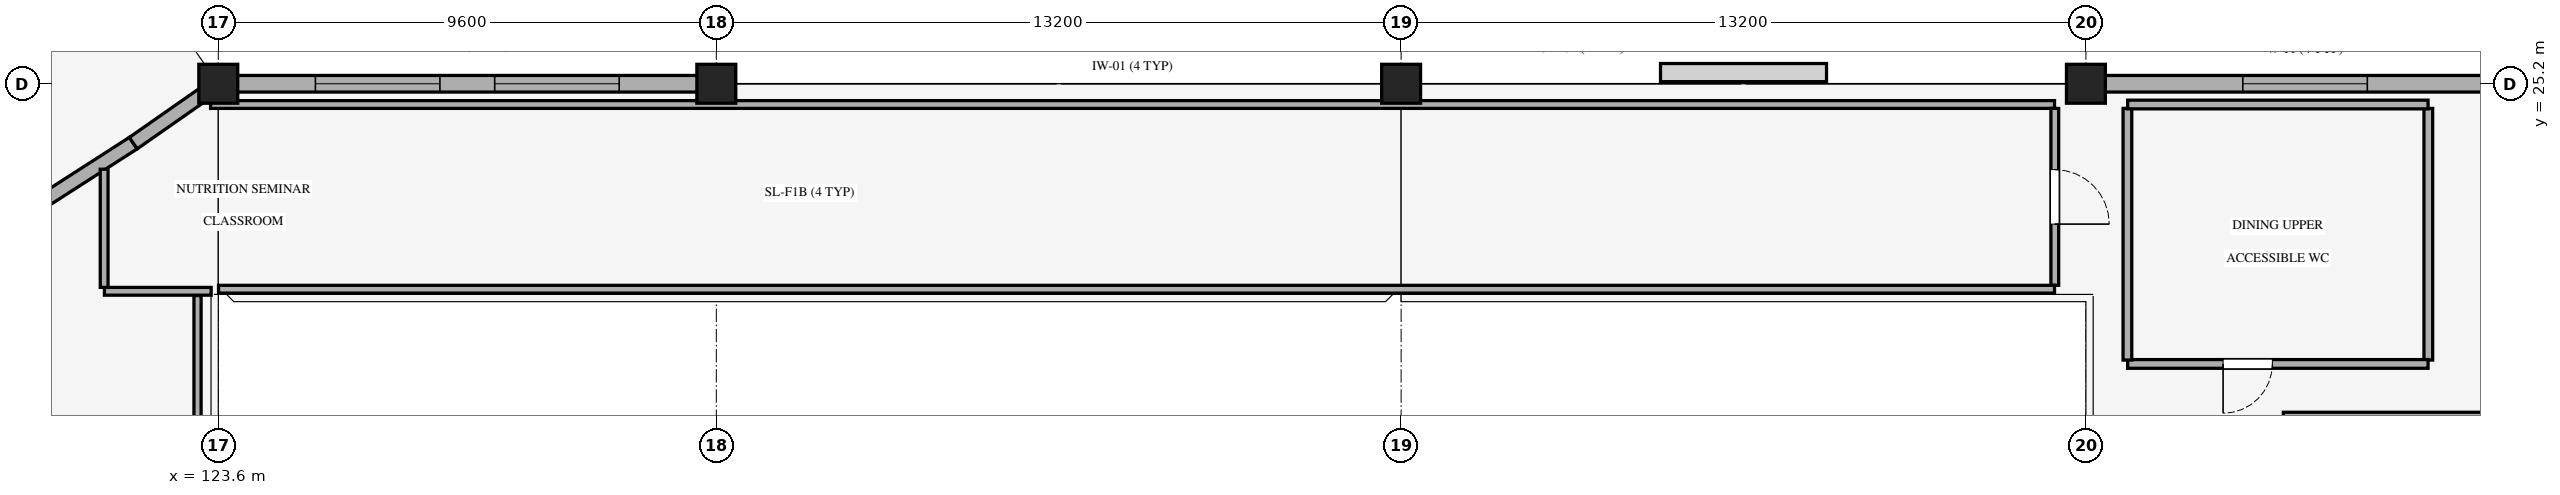
"""IFC4 building model, lengths in metres.
Left out: names, types, materials, properties, quantities, classifications, styles, units other than length and angle.
Written with IfcOpenShell. Run it as: python <this file> out.ifc"""

import sys

from ifc_helpers import new_model, si_unit, direction, frame, frame_2d, origin, origin_2d, place, context, subcontext, project, spatial, rectangle, extrude, element, fill, save


model = new_model("IFC4")
c1 = context("Model", 3, precision=1e-05, world=origin(), true_north=direction((0.0, 1.0)))
c2 = subcontext(c1, "Body", "Model", "MODEL_VIEW")
j1 = project(units=[si_unit("LENGTHUNIT", "METRE"), si_unit("PLANEANGLEUNIT", "RADIAN")], contexts=[c1])
p1 = place(None, origin())
s1 = spatial("IfcSite", under=j1, at=p1, CompositionType="ELEMENT")
p2 = place(p1, origin())
s2 = spatial("IfcBuilding", under=s1, at=p2, CompositionType="ELEMENT")
p3 = place(p2, frame((0.0, 0.0, 4.8)))
s3 = spatial("IfcBuildingStorey", under=s2, at=p3, CompositionType="ELEMENT", Elevation=4.8)
for number, where, z_axis, x_axis in (
    (1, (123.6, 25.2, 0.0), (0.0, 0.0, 1.0), (1.0, 0.0, 0.0)),
    (2, (133.2, 25.2, 0.0), (0.0, 0.0, 1.0), (1.0, 0.0, 0.0)),
    (3, (146.4, 25.2, 0.0), (0.0, 0.0, 1.0), (1.0, 0.0, 0.0)),
    (4, (159.6, 25.2, 0.0), (0.0, 0.0, 1.0), (1.0, 0.0, 0.0)),
):
    element("IfcColumn", number, at=place(p3, frame(where, z_axis=z_axis, x_axis=x_axis)), inside=s3, PredefinedType="COLUMN", context=c2, shape_type="SweptSolid", body=[
        extrude(rectangle(XDim=0.75, YDim=0.75, at=origin_2d()), origin(), (0.0, 0.0, 1.0), 4.8),
    ])
p4 = place(p3, frame((120.28, 22.975, 0.0), z_axis=(0.0, 0.0, 1.0), x_axis=(0.841253874488, 0.540640285826, 0.0)))
e5 = element("IfcWall", 5, at=p4, inside=s3, PredefinedType="STANDARD", context=c2, shape_type="SweptSolid", body=[
    extrude(rectangle(XDim=1.999, YDim=0.268, at=frame_2d((1.0, 0.0))), origin(), (0.0, 0.0, 1.0), 4.205),
])
p5 = place(p3, frame((121.961, 24.056, 0.0), z_axis=(0.0, 0.0, 1.0), x_axis=(0.819942937555, 0.572445263019, 0.0)))
e6 = element("IfcWall", 6, at=p5, inside=s3, PredefinedType="STANDARD", context=c2, shape_type="SweptSolid", body=[
    extrude(rectangle(XDim=1.999, YDim=0.268, at=frame_2d((0.999, 0.0))), origin(), (0.0, 0.0, 1.0), 4.205),
])
p6 = place(p3, frame((123.6, 25.2, 0.0), z_axis=(0.0, 0.0, 1.0), x_axis=(1.0, 0.0, 0.0)))
e7 = element("IfcWall", 7, at=p6, inside=s3, PredefinedType="STANDARD", context=c2, shape_type="SweptSolid", body=[
    extrude(rectangle(XDim=9.6, YDim=0.32, at=frame_2d((4.8, 0.0))), origin(), (0.0, 0.0, 1.0), 4.205),
])
p7 = place(p6, frame((1.872, 0.0, 0.8)))
e8 = element("IfcOpeningElement", 8, at=p7, cuts=e7, PredefinedType="OPENING", context=c2, shape_type="SweptSolid", body=[
    extrude(rectangle(XDim=2.4, YDim=2.1, at=frame_2d((1.2, 1.05))), frame((0.0, 0.17, 0.0), z_axis=(0.0, -1.0, 0.0), x_axis=(1.0, 0.0, 0.0)), (0.0, 0.0, 1.0), 0.34),
])
p8 = place(p6, frame((5.328, 0.0, 0.8)))
e9 = element("IfcOpeningElement", 9, at=p8, cuts=e7, PredefinedType="OPENING", context=c2, shape_type="SweptSolid", body=[
    extrude(rectangle(XDim=2.4, YDim=2.1, at=frame_2d((1.2, 1.05))), frame((0.0, 0.17, 0.0), z_axis=(0.0, -1.0, 0.0), x_axis=(1.0, 0.0, 0.0)), (0.0, 0.0, 1.0), 0.34),
])
p9 = place(p3, frame((159.6, 25.2, 0.0), z_axis=(0.0, 0.0, 1.0), x_axis=(1.0, 0.0, 0.0)))
e10 = element("IfcWall", 10, at=p9, inside=s3, PredefinedType="STANDARD", context=c2, shape_type="SweptSolid", body=[
    extrude(rectangle(XDim=13.2, YDim=0.32, at=frame_2d((6.6, 0.0))), origin(), (0.0, 0.0, 1.0), 4.54),
])
p10 = place(p9, frame((3.024, 0.0, 0.8)))
e11 = element("IfcOpeningElement", 11, at=p10, cuts=e10, PredefinedType="OPENING", context=c2, shape_type="SweptSolid", body=[
    extrude(rectangle(XDim=2.4, YDim=2.1, at=frame_2d((1.2, 1.05))), frame((0.0, 0.17, 0.0), z_axis=(0.0, -1.0, 0.0), x_axis=(1.0, 0.0, 0.0)), (0.0, 0.0, 1.0), 0.34),
])
p11 = place(p9, frame((7.776, 0.0, 0.8)))
e12 = element("IfcOpeningElement", 12, at=p11, cuts=e10, PredefinedType="OPENING", context=c2, shape_type="SweptSolid", body=[
    extrude(rectangle(XDim=2.4, YDim=2.1, at=frame_2d((1.2, 1.05))), frame((0.0, 0.17, 0.0), z_axis=(0.0, -1.0, 0.0), x_axis=(1.0, 0.0, 0.0)), (0.0, 0.0, 1.0), 0.34),
])
p12 = place(p3, frame((123.462, 21.2, 0.0), z_axis=(0.0, 0.0, 1.0), x_axis=(-1.0, 0.0, 0.0)))
e13 = element("IfcWall", 13, at=p12, inside=s3, PredefinedType="STANDARD", context=c2, shape_type="SweptSolid", body=[
    extrude(rectangle(XDim=2.057, YDim=0.15, at=frame_2d((1.029, 0.0))), origin(), (0.0, 0.0, 1.0), 4.54),
])
p13 = place(p3, frame((121.4, 21.275, 0.0), z_axis=(0.0, 0.0, 1.0), x_axis=(0.0, 1.0, 0.0)))
e14 = element("IfcWall", 14, at=p13, inside=s3, PredefinedType="STANDARD", context=c2, shape_type="SweptSolid", body=[
    extrude(rectangle(XDim=2.278, YDim=0.15, at=frame_2d((1.139, 0.0))), origin(), (0.0, 0.0, 1.0), 4.205),
])
p14 = place(p3, frame((123.451, 24.8, 0.0), z_axis=(0.0, 0.0, 1.0), x_axis=(1.0, 0.0, 0.0)))
e15 = element("IfcWall", 15, at=p14, inside=s3, PredefinedType="STANDARD", context=c2, shape_type="SweptSolid", body=[
    extrude(rectangle(XDim=35.544, YDim=0.15, at=frame_2d((17.772, 0.0))), origin(), (0.0, 0.0, 1.0), 4.205),
])
p15 = place(p3, frame((159.0, 24.725, 0.0), z_axis=(0.0, 0.0, 1.0), x_axis=(0.0, -1.0, 0.0)))
e16 = element("IfcWall", 16, at=p15, inside=s3, PredefinedType="STANDARD", context=c2, shape_type="SweptSolid", body=[
    extrude(rectangle(XDim=3.41, YDim=0.15, at=frame_2d((1.705, 0.0))), origin(), (0.0, 0.0, 1.0), 4.54),
])
p16 = place(p15, frame((1.18, 0.0, 0.0)))
e17 = element("IfcOpeningElement", 17, at=p16, cuts=e16, PredefinedType="OPENING", context=c2, shape_type="SweptSolid", body=[
    extrude(rectangle(XDim=1.05, YDim=2.15, at=frame_2d((0.525, 1.075))), frame((0.0, 0.085, 0.0), z_axis=(0.0, -1.0, 0.0), x_axis=(1.0, 0.0, 0.0)), (0.0, 0.0, 1.0), 0.17),
])
p17 = place(p3, frame((158.995, 21.24, 0.0), z_axis=(0.0, 0.0, 1.0), x_axis=(-1.0, 0.0, 0.0)))
e18 = element("IfcWall", 18, at=p17, inside=s3, PredefinedType="STANDARD", context=c2, shape_type="SweptSolid", body=[
    extrude(rectangle(XDim=35.39, YDim=0.15, at=frame_2d((17.695, 0.0))), origin(), (0.0, 0.0, 1.0), 4.54),
])
p18 = place(p3, frame((123.2, 21.117, 0.0), z_axis=(0.0, 0.0, 1.0), x_axis=(0.0, -1.0, 0.0)))
e19 = element("IfcWall", 19, at=p18, inside=s3, PredefinedType="STANDARD", context=c2, shape_type="SweptSolid", body=[
    extrude(rectangle(XDim=12.242, YDim=0.138, at=frame_2d((6.121, 0.0))), origin(), (0.0, 0.0, 1.0), 4.54),
])
p19 = place(p3, frame((163.405, 18.8, 0.0), z_axis=(0.0, 0.0, 1.0), x_axis=(1.0, 0.0, 0.0)))
e20 = element("IfcWall", 20, at=p19, inside=s3, PredefinedType="STANDARD", context=c2, shape_type="SweptSolid", body=[
    extrude(rectangle(XDim=8.99, YDim=0.138, at=frame_2d((4.495, 0.0))), origin(), (0.0, 0.0, 1.0), 4.54),
])
p20 = place(p3, frame((166.2, 24.725, 0.0), z_axis=(0.0, 0.0, 1.0), x_axis=(0.0, -1.0, 0.0)))
e21 = element("IfcWall", 21, at=p20, inside=s3, PredefinedType="STANDARD", context=c2, shape_type="SweptSolid", body=[
    extrude(rectangle(XDim=4.85, YDim=0.168, at=frame_2d((2.425, 0.0))), origin(), (0.0, 0.0, 1.0), 4.54),
])
p21 = place(p3, frame((166.195, 19.8, 0.0), z_axis=(0.0, 0.0, 1.0), x_axis=(-1.0, 0.0, 0.0)))
e22 = element("IfcWall", 22, at=p21, inside=s3, PredefinedType="STANDARD", context=c2, shape_type="SweptSolid", body=[
    extrude(rectangle(XDim=5.79, YDim=0.168, at=frame_2d((2.895, 0.0))), origin(), (0.0, 0.0, 1.0), 4.54),
])
p22 = place(p21, frame((3.001, 0.0, 0.0)))
e23 = element("IfcOpeningElement", 23, at=p22, cuts=e22, PredefinedType="OPENING", context=c2, shape_type="SweptSolid", body=[
    extrude(rectangle(XDim=0.95, YDim=2.1, at=frame_2d((0.475, 1.05))), frame((0.0, 0.094, 0.0), z_axis=(0.0, -1.0, 0.0), x_axis=(1.0, 0.0, 0.0)), (0.0, 0.0, 1.0), 0.188),
])
p23 = place(p3, frame((160.4, 19.875, 0.0), z_axis=(0.0, 0.0, 1.0), x_axis=(0.0, 1.0, 0.0)))
e24 = element("IfcWall", 24, at=p23, inside=s3, PredefinedType="STANDARD", context=c2, shape_type="SweptSolid", body=[
    extrude(rectangle(XDim=4.85, YDim=0.168, at=frame_2d((2.425, 0.0))), origin(), (0.0, 0.0, 1.0), 4.54),
])
p24 = place(p3, frame((160.405, 24.8, 0.0), z_axis=(0.0, 0.0, 1.0), x_axis=(1.0, 0.0, 0.0)))
e25 = element("IfcWall", 25, at=p24, inside=s3, PredefinedType="STANDARD", context=c2, shape_type="SweptSolid", body=[
    extrude(rectangle(XDim=5.79, YDim=0.168, at=frame_2d((2.895, 0.0))), origin(), (0.0, 0.0, 1.0), 4.54),
])
p25 = place(p7, origin())
e26 = element("IfcWindow", 26, at=p25, inside=s3, PartitioningType="SINGLE_PANEL", PredefinedType="WINDOW", context=c2, shape_type="SweptSolid", body=[
    extrude(rectangle(XDim=2.4, YDim=2.1, at=frame_2d((1.2, 1.05))), frame((0.0, 0.03, 0.0), z_axis=(0.0, -1.0, 0.0), x_axis=(1.0, 0.0, 0.0)), (0.0, 0.0, 1.0), 0.06),
])
fill(e8, e26)
p26 = place(p8, origin())
e27 = element("IfcWindow", 27, at=p26, inside=s3, PartitioningType="SINGLE_PANEL", PredefinedType="WINDOW", context=c2, shape_type="SweptSolid", body=[
    extrude(rectangle(XDim=2.4, YDim=2.1, at=frame_2d((1.2, 1.05))), frame((0.0, 0.03, 0.0), z_axis=(0.0, -1.0, 0.0), x_axis=(1.0, 0.0, 0.0)), (0.0, 0.0, 1.0), 0.06),
])
fill(e9, e27)
p27 = place(p10, origin())
e28 = element("IfcWindow", 28, at=p27, inside=s3, PartitioningType="SINGLE_PANEL", PredefinedType="WINDOW", context=c2, shape_type="SweptSolid", body=[
    extrude(rectangle(XDim=2.4, YDim=2.1, at=frame_2d((1.2, 1.05))), frame((0.0, 0.03, 0.0), z_axis=(0.0, -1.0, 0.0), x_axis=(1.0, 0.0, 0.0)), (0.0, 0.0, 1.0), 0.06),
])
fill(e11, e28)
p28 = place(p16, origin())
e29 = element("IfcDoor", 29, at=p28, inside=s3, OperationType="SINGLE_SWING_RIGHT", PredefinedType="DOOR", context=c2, shape_type="SweptSolid", body=[
    extrude(rectangle(XDim=1.05, YDim=2.15, at=frame_2d((0.525, 1.075))), frame((0.0, 0.025, 0.0), z_axis=(0.0, -1.0, 0.0), x_axis=(1.0, 0.0, 0.0)), (0.0, 0.0, 1.0), 0.05),
])
fill(e17, e29)
p29 = place(p22, origin())
e30 = element("IfcDoor", 30, at=p29, inside=s3, OperationType="SINGLE_SWING_RIGHT", PredefinedType="DOOR", context=c2, shape_type="SweptSolid", body=[
    extrude(rectangle(XDim=0.95, YDim=2.1, at=frame_2d((0.475, 1.05))), frame((0.0, 0.025, 0.0), z_axis=(0.0, -1.0, 0.0), x_axis=(1.0, 0.0, 0.0)), (0.0, 0.0, 1.0), 0.05),
])
fill(e23, e30)
save(model, sys.argv[1])
